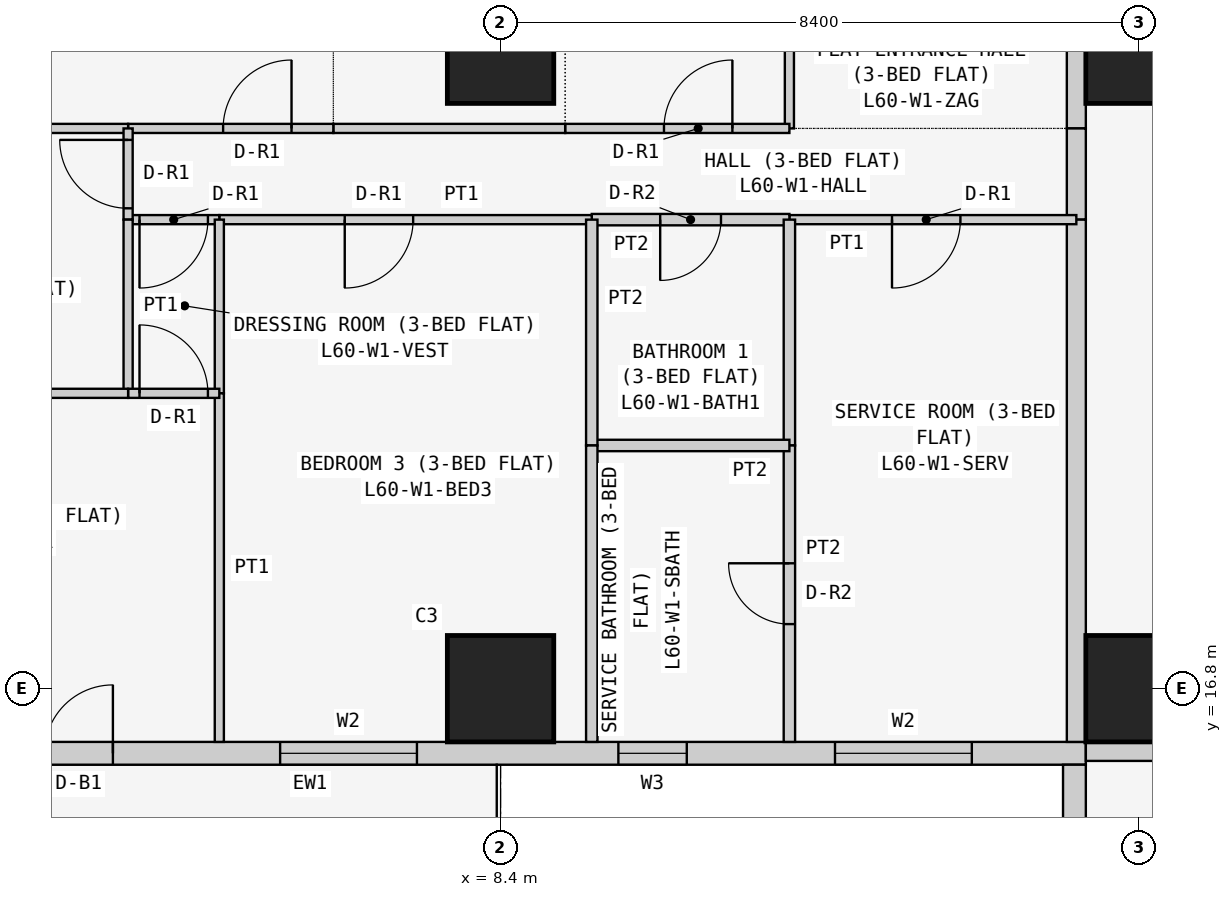
"""IFC4 building model, lengths in metres.
Left out: names, types, materials, properties, quantities, classifications, styles, units other than length and angle.
Written with IfcOpenShell. Run it as: python <this file> out.ifc"""

import sys

from ifc_helpers import new_model, si_unit, direction, frame, frame_2d, origin, origin_2d, place, context, subcontext, project, spatial, rectangle, extrude, element, fill, save


model = new_model("IFC4")
c1 = context("Model", 3, precision=1e-05, world=origin(), true_north=direction((0.0, 1.0)))
c2 = subcontext(c1, "Body", "Model", "MODEL_VIEW")
j1 = project(units=[si_unit("LENGTHUNIT", "METRE"), si_unit("PLANEANGLEUNIT", "RADIAN")], contexts=[c1])
p1 = place(None, origin())
s1 = spatial("IfcSite", under=j1, at=p1, CompositionType="ELEMENT")
p2 = place(p1, origin())
s2 = spatial("IfcBuilding", under=s1, at=p2, CompositionType="ELEMENT")
p3 = place(p2, frame((0.0, 0.0, 230.1)))
s3 = spatial("IfcBuildingStorey", under=s2, at=p3, CompositionType="ELEMENT", Elevation=230.1)
for number, where, z_axis, x_axis in (
    (1, (8.4, 16.8, 0.0), (0.0, 0.0, 1.0), (1.0, 0.0, 0.0)),
    (2, (8.4, 25.2, 0.0), (0.0, 0.0, 1.0), (1.0, 0.0, 0.0)),
    (3, (16.8, 16.8, 0.0), (0.0, 0.0, 1.0), (1.0, 0.0, 0.0)),
    (4, (16.8, 25.2, 0.0), (0.0, 0.0, 1.0), (1.0, 0.0, 0.0)),
):
    element("IfcColumn", number, at=place(p3, frame(where, z_axis=z_axis, x_axis=x_axis)), inside=s3, PredefinedType="COLUMN", context=c2, shape_type="SweptSolid", body=[
        extrude(rectangle(XDim=1.4, YDim=1.4, at=origin_2d()), origin(), (0.0, 0.0, 1.0), 3.6),
    ])
p4 = place(p3, frame((0.4, 15.95, 0.0), z_axis=(0.0, 0.0, 1.0), x_axis=(1.0, 0.0, 0.0)))
e5 = element("IfcWall", 5, at=p4, inside=s3, PredefinedType="SOLIDWALL", context=c2, shape_type="SweptSolid", body=[
    extrude(rectangle(XDim=15.7, YDim=0.3, at=frame_2d((7.85, 0.0))), origin(), (0.0, 0.0, 1.0), 3.45),
])
p5 = place(p4, frame((12.4, 0.0, 0.9)))
e6 = element("IfcOpeningElement", 6, at=p5, cuts=e5, PredefinedType="OPENING", context=c2, shape_type="SweptSolid", body=[
    extrude(rectangle(XDim=1.8, YDim=1.5, at=frame_2d((0.9, 0.75))), frame((0.0, 0.16, 0.0), z_axis=(0.0, -1.0, 0.0), x_axis=(1.0, 0.0, 0.0)), (0.0, 0.0, 1.0), 0.32),
])
p6 = place(p4, frame((9.55, 0.0, 1.5)))
e7 = element("IfcOpeningElement", 7, at=p6, cuts=e5, PredefinedType="OPENING", context=c2, shape_type="SweptSolid", body=[
    extrude(rectangle(XDim=0.9, YDim=0.7, at=frame_2d((0.45, 0.35))), frame((0.0, 0.16, 0.0), z_axis=(0.0, -1.0, 0.0), x_axis=(1.0, 0.0, 0.0)), (0.0, 0.0, 1.0), 0.32),
])
p7 = place(p4, frame((5.1, 0.0, 0.9)))
e8 = element("IfcOpeningElement", 8, at=p7, cuts=e5, PredefinedType="OPENING", context=c2, shape_type="SweptSolid", body=[
    extrude(rectangle(XDim=1.8, YDim=1.5, at=frame_2d((0.9, 0.75))), frame((0.0, 0.16, 0.0), z_axis=(0.0, -1.0, 0.0), x_axis=(1.0, 0.0, 0.0)), (0.0, 0.0, 1.0), 0.32),
])
p8 = place(p4, frame((2.0, 0.0, 0.0)))
e9 = element("IfcOpeningElement", 9, at=p8, cuts=e5, PredefinedType="OPENING", context=c2, shape_type="SweptSolid", body=[
    extrude(rectangle(XDim=0.9, YDim=2.4, at=frame_2d((0.45, 1.2))), frame((0.0, 0.16, 0.0), z_axis=(0.0, -1.0, 0.0), x_axis=(1.0, 0.0, 0.0)), (0.0, 0.0, 1.0), 0.32),
])
p9 = place(p4, frame((0.7, 0.0, 0.9)))
e10 = element("IfcOpeningElement", 10, at=p9, cuts=e5, PredefinedType="OPENING", context=c2, shape_type="SweptSolid", body=[
    extrude(rectangle(XDim=1.2, YDim=1.5, at=frame_2d((0.6, 0.75))), frame((0.0, 0.16, 0.0), z_axis=(0.0, -1.0, 0.0), x_axis=(1.0, 0.0, 0.0)), (0.0, 0.0, 1.0), 0.32),
])
p10 = place(p3, frame((15.95, 15.8, 0.0), z_axis=(0.0, 0.0, 1.0), x_axis=(0.0, -1.0, 0.0)))
e11 = element("IfcWall", 11, at=p10, inside=s3, PredefinedType="SOLIDWALL", context=c2, shape_type="SweptSolid", body=[
    extrude(rectangle(XDim=7.0, YDim=0.3, at=frame_2d((3.5, 0.0))), origin(), (0.0, 0.0, 1.0), 3.45),
])
p11 = place(p10, frame((1.5, 0.0, 0.9)))
e12 = element("IfcOpeningElement", 12, at=p11, cuts=e11, PredefinedType="OPENING", context=c2, shape_type="SweptSolid", body=[
    extrude(rectangle(XDim=2.4, YDim=1.5, at=frame_2d((1.2, 0.75))), frame((0.0, 0.16, 0.0), z_axis=(0.0, -1.0, 0.0), x_axis=(1.0, 0.0, 0.0)), (0.0, 0.0, 1.0), 0.32),
])
p12 = place(p10, frame((5.05, 0.0, 0.9)))
e13 = element("IfcOpeningElement", 13, at=p12, cuts=e11, PredefinedType="OPENING", context=c2, shape_type="SweptSolid", body=[
    extrude(rectangle(XDim=1.2, YDim=1.5, at=frame_2d((0.6, 0.75))), frame((0.0, 0.16, 0.0), z_axis=(0.0, -1.0, 0.0), x_axis=(1.0, 0.0, 0.0)), (0.0, 0.0, 1.0), 0.32),
])
p13 = place(p3, frame((22.971, 15.975, 0.0), z_axis=(0.0, 0.0, 1.0), x_axis=(-1.0, 0.0, 0.0)))
e14 = element("IfcWall", 14, at=p13, inside=s3, PredefinedType="PARTITIONING", context=c2, shape_type="SweptSolid", body=[
    extrude(rectangle(XDim=6.871, YDim=0.25, at=frame_2d((3.436, 0.0))), origin(), (0.0, 0.0, 1.0), 3.45),
])
p14 = place(p3, frame((15.975, 24.171, 0.0), z_axis=(0.0, 0.0, 1.0), x_axis=(0.0, 1.0, 0.0)))
e15 = element("IfcWall", 15, at=p14, inside=s3, PredefinedType="PARTITIONING", context=c2, shape_type="SweptSolid", body=[
    extrude(rectangle(XDim=5.229, YDim=0.25, at=frame_2d((2.615, 0.0))), origin(), (0.0, 0.0, 1.0), 3.45),
])
p15 = place(p14, frame((2.129, 0.0, 0.0)))
e16 = element("IfcOpeningElement", 16, at=p15, cuts=e15, PredefinedType="OPENING", context=c2, shape_type="SweptSolid", body=[
    extrude(rectangle(XDim=1.0, YDim=2.1, at=frame_2d((0.5, 1.05))), frame((0.0, 0.135, 0.0), z_axis=(0.0, -1.0, 0.0), x_axis=(1.0, 0.0, 0.0)), (0.0, 0.0, 1.0), 0.27),
])
p16 = place(p3, frame((15.975, 22.971, 0.0), z_axis=(0.0, 0.0, 1.0), x_axis=(0.0, 1.0, 0.0)))
e17 = element("IfcWall", 17, at=p16, inside=s3, PredefinedType="PARTITIONING", context=c2, shape_type="SweptSolid", body=[
    extrude(rectangle(XDim=1.2, YDim=0.25, at=frame_2d((0.6, 0.0))), origin(), (0.0, 0.0, 1.0), 3.45),
])
p17 = place(p3, frame((15.975, 16.1, 0.0), z_axis=(0.0, 0.0, 1.0), x_axis=(0.0, 1.0, 0.0)))
e18 = element("IfcWall", 18, at=p17, inside=s3, PredefinedType="PARTITIONING", context=c2, shape_type="SweptSolid", body=[
    extrude(rectangle(XDim=6.871, YDim=0.25, at=frame_2d((3.436, 0.0))), origin(), (0.0, 0.0, 1.0), 3.45),
])
p18 = place(p3, frame((12.2, 29.4, 0.0), z_axis=(0.0, 0.0, 1.0), x_axis=(0.0, -1.0, 0.0)))
e19 = element("IfcWall", 19, at=p18, inside=s3, PredefinedType="PARTITIONING", context=c2, shape_type="SweptSolid", body=[
    extrude(rectangle(XDim=5.229, YDim=0.12, at=frame_2d((2.615, 0.0))), origin(), (0.0, 0.0, 1.0), 3.45),
])
p19 = place(p3, frame((9.25, 24.171, 0.0), z_axis=(0.0, 0.0, 1.0), x_axis=(1.0, 0.0, 0.0)))
e20 = element("IfcWall", 20, at=p19, inside=s3, PredefinedType="PARTITIONING", context=c2, shape_type="SweptSolid", body=[
    extrude(rectangle(XDim=2.95, YDim=0.12, at=frame_2d((1.475, 0.0))), origin(), (0.0, 0.0, 1.0), 3.45),
])
p20 = place(p19, frame((1.3, 0.0, 0.0)))
e21 = element("IfcOpeningElement", 21, at=p20, cuts=e20, PredefinedType="OPENING", context=c2, shape_type="SweptSolid", body=[
    extrude(rectangle(XDim=0.9, YDim=2.1, at=frame_2d((0.45, 1.05))), frame((0.0, 0.07, 0.0), z_axis=(0.0, -1.0, 0.0), x_axis=(1.0, 0.0, 0.0)), (0.0, 0.0, 1.0), 0.14),
])
p21 = place(p3, frame((6.2, 24.171, 0.0), z_axis=(0.0, 0.0, 1.0), x_axis=(1.0, 0.0, 0.0)))
e22 = element("IfcWall", 22, at=p21, inside=s3, PredefinedType="PARTITIONING", context=c2, shape_type="SweptSolid", body=[
    extrude(rectangle(XDim=3.05, YDim=0.12, at=frame_2d((1.525, 0.0))), origin(), (0.0, 0.0, 1.0), 3.45),
])
p22 = place(p3, frame((3.5, 24.171, 0.0), z_axis=(0.0, 0.0, 1.0), x_axis=(1.0, 0.0, 0.0)))
e23 = element("IfcWall", 23, at=p22, inside=s3, PredefinedType="PARTITIONING", context=c2, shape_type="SweptSolid", body=[
    extrude(rectangle(XDim=2.7, YDim=0.12, at=frame_2d((1.35, 0.0))), origin(), (0.0, 0.0, 1.0), 3.45),
])
p23 = place(p22, frame((1.25, 0.0, 0.0)))
e24 = element("IfcOpeningElement", 24, at=p23, cuts=e23, PredefinedType="OPENING", context=c2, shape_type="SweptSolid", body=[
    extrude(rectangle(XDim=0.9, YDim=2.1, at=frame_2d((0.45, 1.05))), frame((0.0, 0.07, 0.0), z_axis=(0.0, -1.0, 0.0), x_axis=(1.0, 0.0, 0.0)), (0.0, 0.0, 1.0), 0.14),
])
p24 = place(p3, frame((-0.65, 24.171, 0.0), z_axis=(0.0, 0.0, 1.0), x_axis=(1.0, 0.0, 0.0)))
e25 = element("IfcWall", 25, at=p24, inside=s3, PredefinedType="PARTITIONING", context=c2, shape_type="SweptSolid", body=[
    extrude(rectangle(XDim=4.15, YDim=0.12, at=frame_2d((2.075, 0.0))), origin(), (0.0, 0.0, 1.0), 3.45),
])
p25 = place(p3, frame((12.2, 22.971, 0.0), z_axis=(0.0, 0.0, 1.0), x_axis=(1.0, 0.0, 0.0)))
e26 = element("IfcWall", 26, at=p25, inside=s3, PredefinedType="PARTITIONING", context=c2, shape_type="SweptSolid", body=[
    extrude(rectangle(XDim=3.775, YDim=0.12, at=frame_2d((1.888, 0.0))), origin(), (0.0, 0.0, 1.0), 3.45),
])
p26 = place(p25, frame((1.35, 0.0, 0.0)))
e27 = element("IfcOpeningElement", 27, at=p26, cuts=e26, PredefinedType="OPENING", context=c2, shape_type="SweptSolid", body=[
    extrude(rectangle(XDim=0.9, YDim=2.1, at=frame_2d((0.45, 1.05))), frame((0.0, 0.07, 0.0), z_axis=(0.0, -1.0, 0.0), x_axis=(1.0, 0.0, 0.0)), (0.0, 0.0, 1.0), 0.14),
])
p27 = place(p3, frame((9.6, 22.971, 0.0), z_axis=(0.0, 0.0, 1.0), x_axis=(1.0, 0.0, 0.0)))
e28 = element("IfcWall", 28, at=p27, inside=s3, PredefinedType="PARTITIONING", context=c2, shape_type="SweptSolid", body=[
    extrude(rectangle(XDim=2.6, YDim=0.15, at=frame_2d((1.3, 0.0))), origin(), (0.0, 0.0, 1.0), 3.45),
])
p28 = place(p27, frame((0.9, 0.0, 0.0)))
e29 = element("IfcOpeningElement", 29, at=p28, cuts=e28, PredefinedType="OPENING", context=c2, shape_type="SweptSolid", body=[
    extrude(rectangle(XDim=0.8, YDim=2.1, at=frame_2d((0.4, 1.05))), frame((0.0, 0.085, 0.0), z_axis=(0.0, -1.0, 0.0), x_axis=(1.0, 0.0, 0.0)), (0.0, 0.0, 1.0), 0.17),
])
p29 = place(p3, frame((4.7, 22.971, 0.0), z_axis=(0.0, 0.0, 1.0), x_axis=(1.0, 0.0, 0.0)))
e30 = element("IfcWall", 30, at=p29, inside=s3, PredefinedType="PARTITIONING", context=c2, shape_type="SweptSolid", body=[
    extrude(rectangle(XDim=4.9, YDim=0.12, at=frame_2d((2.45, 0.0))), origin(), (0.0, 0.0, 1.0), 3.45),
])
p30 = place(p29, frame((1.65, 0.0, 0.0)))
e31 = element("IfcOpeningElement", 31, at=p30, cuts=e30, PredefinedType="OPENING", context=c2, shape_type="SweptSolid", body=[
    extrude(rectangle(XDim=0.9, YDim=2.1, at=frame_2d((0.45, 1.05))), frame((0.0, 0.07, 0.0), z_axis=(0.0, -1.0, 0.0), x_axis=(1.0, 0.0, 0.0)), (0.0, 0.0, 1.0), 0.14),
])
p31 = place(p3, frame((3.5, 22.971, 0.0), z_axis=(0.0, 0.0, 1.0), x_axis=(1.0, 0.0, 0.0)))
e32 = element("IfcWall", 32, at=p31, inside=s3, PredefinedType="PARTITIONING", context=c2, shape_type="SweptSolid", body=[
    extrude(rectangle(XDim=1.2, YDim=0.12, at=frame_2d((0.6, 0.0))), origin(), (0.0, 0.0, 1.0), 3.45),
])
p32 = place(p31, frame((0.15, 0.0, 0.0)))
e33 = element("IfcOpeningElement", 33, at=p32, cuts=e32, PredefinedType="OPENING", context=c2, shape_type="SweptSolid", body=[
    extrude(rectangle(XDim=0.9, YDim=2.1, at=frame_2d((0.45, 1.05))), frame((0.0, 0.07, 0.0), z_axis=(0.0, -1.0, 0.0), x_axis=(1.0, 0.0, 0.0)), (0.0, 0.0, 1.0), 0.14),
])
p33 = place(p3, frame((3.5, 24.171, 0.0), z_axis=(0.0, 0.0, 1.0), x_axis=(0.0, -1.0, 0.0)))
e34 = element("IfcWall", 34, at=p33, inside=s3, PredefinedType="PARTITIONING", context=c2, shape_type="SweptSolid", body=[
    extrude(rectangle(XDim=1.2, YDim=0.12, at=frame_2d((0.6, 0.0))), origin(), (0.0, 0.0, 1.0), 3.45),
])
p34 = place(p33, frame((0.151, 0.0, 0.0)))
e35 = element("IfcOpeningElement", 35, at=p34, cuts=e34, PredefinedType="OPENING", context=c2, shape_type="SweptSolid", body=[
    extrude(rectangle(XDim=0.9, YDim=2.1, at=frame_2d((0.45, 1.05))), frame((0.0, 0.07, 0.0), z_axis=(0.0, -1.0, 0.0), x_axis=(1.0, 0.0, 0.0)), (0.0, 0.0, 1.0), 0.14),
])
p35 = place(p3, frame((12.2, 22.971, 0.0), z_axis=(0.0, 0.0, 1.0), x_axis=(0.0, -1.0, 0.0)))
e36 = element("IfcWall", 36, at=p35, inside=s3, PredefinedType="PARTITIONING", context=c2, shape_type="SweptSolid", body=[
    extrude(rectangle(XDim=2.971, YDim=0.15, at=frame_2d((1.485, 0.0))), origin(), (0.0, 0.0, 1.0), 3.45),
])
p36 = place(p3, frame((12.2, 20.0, 0.0), z_axis=(0.0, 0.0, 1.0), x_axis=(0.0, -1.0, 0.0)))
e37 = element("IfcWall", 37, at=p36, inside=s3, PredefinedType="PARTITIONING", context=c2, shape_type="SweptSolid", body=[
    extrude(rectangle(XDim=3.9, YDim=0.15, at=frame_2d((1.95, 0.0))), origin(), (0.0, 0.0, 1.0), 3.45),
])
p37 = place(p36, frame((1.55, 0.0, 0.0)))
e38 = element("IfcOpeningElement", 38, at=p37, cuts=e37, PredefinedType="OPENING", context=c2, shape_type="SweptSolid", body=[
    extrude(rectangle(XDim=0.8, YDim=2.1, at=frame_2d((0.4, 1.05))), frame((0.0, 0.085, 0.0), z_axis=(0.0, -1.0, 0.0), x_axis=(1.0, 0.0, 0.0)), (0.0, 0.0, 1.0), 0.17),
])
p38 = place(p3, frame((9.6, 20.0, 0.0), z_axis=(0.0, 0.0, 1.0), x_axis=(1.0, 0.0, 0.0)))
e39 = element("IfcWall", 39, at=p38, inside=s3, PredefinedType="PARTITIONING", context=c2, shape_type="SweptSolid", body=[
    extrude(rectangle(XDim=2.6, YDim=0.15, at=frame_2d((1.3, 0.0))), origin(), (0.0, 0.0, 1.0), 3.45),
])
p39 = place(p3, frame((9.6, 22.971, 0.0), z_axis=(0.0, 0.0, 1.0), x_axis=(0.0, -1.0, 0.0)))
e40 = element("IfcWall", 40, at=p39, inside=s3, PredefinedType="PARTITIONING", context=c2, shape_type="SweptSolid", body=[
    extrude(rectangle(XDim=2.971, YDim=0.15, at=frame_2d((1.485, 0.0))), origin(), (0.0, 0.0, 1.0), 3.45),
])
p40 = place(p3, frame((9.6, 20.0, 0.0), z_axis=(0.0, 0.0, 1.0), x_axis=(0.0, -1.0, 0.0)))
e41 = element("IfcWall", 41, at=p40, inside=s3, PredefinedType="PARTITIONING", context=c2, shape_type="SweptSolid", body=[
    extrude(rectangle(XDim=3.9, YDim=0.15, at=frame_2d((1.95, 0.0))), origin(), (0.0, 0.0, 1.0), 3.45),
])
p41 = place(p3, frame((4.7, 22.971, 0.0), z_axis=(0.0, 0.0, 1.0), x_axis=(0.0, -1.0, 0.0)))
e42 = element("IfcWall", 42, at=p41, inside=s3, PredefinedType="PARTITIONING", context=c2, shape_type="SweptSolid", body=[
    extrude(rectangle(XDim=2.285, YDim=0.12, at=frame_2d((1.143, 0.0))), origin(), (0.0, 0.0, 1.0), 3.45),
])
p42 = place(p3, frame((4.7, 20.686, 0.0), z_axis=(0.0, 0.0, 1.0), x_axis=(0.0, -1.0, 0.0)))
e43 = element("IfcWall", 43, at=p42, inside=s3, PredefinedType="PARTITIONING", context=c2, shape_type="SweptSolid", body=[
    extrude(rectangle(XDim=4.586, YDim=0.12, at=frame_2d((2.293, 0.0))), origin(), (0.0, 0.0, 1.0), 3.45),
])
p43 = place(p3, frame((3.5, 22.971, 0.0), z_axis=(0.0, 0.0, 1.0), x_axis=(0.0, -1.0, 0.0)))
e44 = element("IfcWall", 44, at=p43, inside=s3, PredefinedType="PARTITIONING", context=c2, shape_type="SweptSolid", body=[
    extrude(rectangle(XDim=2.285, YDim=0.12, at=frame_2d((1.143, 0.0))), origin(), (0.0, 0.0, 1.0), 3.45),
])
p44 = place(p3, frame((3.5, 20.686, 0.0), z_axis=(0.0, 0.0, 1.0), x_axis=(1.0, 0.0, 0.0)))
e45 = element("IfcWall", 45, at=p44, inside=s3, PredefinedType="PARTITIONING", context=c2, shape_type="SweptSolid", body=[
    extrude(rectangle(XDim=1.2, YDim=0.12, at=frame_2d((0.6, 0.0))), origin(), (0.0, 0.0, 1.0), 3.45),
])
p45 = place(p44, frame((0.15, 0.0, 0.0)))
e46 = element("IfcOpeningElement", 46, at=p45, cuts=e45, PredefinedType="OPENING", context=c2, shape_type="SweptSolid", body=[
    extrude(rectangle(XDim=0.9, YDim=2.1, at=frame_2d((0.45, 1.05))), frame((0.0, 0.07, 0.0), z_axis=(0.0, -1.0, 0.0), x_axis=(1.0, 0.0, 0.0)), (0.0, 0.0, 1.0), 0.14),
])
p46 = place(p3, frame((-0.65, 20.686, 0.0), z_axis=(0.0, 0.0, 1.0), x_axis=(1.0, 0.0, 0.0)))
e47 = element("IfcWall", 47, at=p46, inside=s3, PredefinedType="PARTITIONING", context=c2, shape_type="SweptSolid", body=[
    extrude(rectangle(XDim=4.15, YDim=0.12, at=frame_2d((2.075, 0.0))), origin(), (0.0, 0.0, 1.0), 3.45),
])
p47 = place(p5, origin())
e48 = element("IfcWindow", 48, at=p47, inside=s3, PartitioningType="SINGLE_PANEL", PredefinedType="WINDOW", context=c2, shape_type="SweptSolid", body=[
    extrude(rectangle(XDim=1.8, YDim=1.5, at=frame_2d((0.9, 0.75))), frame((0.0, 0.03, 0.0), z_axis=(0.0, -1.0, 0.0), x_axis=(1.0, 0.0, 0.0)), (0.0, 0.0, 1.0), 0.06),
])
fill(e6, e48)
p48 = place(p6, origin())
e49 = element("IfcWindow", 49, at=p48, inside=s3, PartitioningType="SINGLE_PANEL", PredefinedType="WINDOW", context=c2, shape_type="SweptSolid", body=[
    extrude(rectangle(XDim=0.9, YDim=0.7, at=frame_2d((0.45, 0.35))), frame((0.0, 0.03, 0.0), z_axis=(0.0, -1.0, 0.0), x_axis=(1.0, 0.0, 0.0)), (0.0, 0.0, 1.0), 0.06),
])
fill(e7, e49)
p49 = place(p7, origin())
e50 = element("IfcWindow", 50, at=p49, inside=s3, PartitioningType="SINGLE_PANEL", PredefinedType="WINDOW", context=c2, shape_type="SweptSolid", body=[
    extrude(rectangle(XDim=1.8, YDim=1.5, at=frame_2d((0.9, 0.75))), frame((0.0, 0.03, 0.0), z_axis=(0.0, -1.0, 0.0), x_axis=(1.0, 0.0, 0.0)), (0.0, 0.0, 1.0), 0.06),
])
fill(e8, e50)
p50 = place(p8, origin())
e51 = element("IfcDoor", 51, at=p50, inside=s3, OperationType="SINGLE_SWING_RIGHT", PredefinedType="DOOR", context=c2, shape_type="SweptSolid", body=[
    extrude(rectangle(XDim=0.9, YDim=2.4, at=frame_2d((0.45, 1.2))), frame((0.0, 0.025, 0.0), z_axis=(0.0, -1.0, 0.0), x_axis=(1.0, 0.0, 0.0)), (0.0, 0.0, 1.0), 0.05),
])
fill(e9, e51)
p51 = place(p20, origin())
e52 = element("IfcDoor", 52, at=p51, inside=s3, OperationType="SINGLE_SWING_RIGHT", PredefinedType="DOOR", context=c2, shape_type="SweptSolid", body=[
    extrude(rectangle(XDim=0.9, YDim=2.1, at=frame_2d((0.45, 1.05))), frame((0.0, 0.025, 0.0), z_axis=(0.0, -1.0, 0.0), x_axis=(1.0, 0.0, 0.0)), (0.0, 0.0, 1.0), 0.05),
])
fill(e21, e52)
p52 = place(p23, origin())
e53 = element("IfcDoor", 53, at=p52, inside=s3, OperationType="SINGLE_SWING_RIGHT", PredefinedType="DOOR", context=c2, shape_type="SweptSolid", body=[
    extrude(rectangle(XDim=0.9, YDim=2.1, at=frame_2d((0.45, 1.05))), frame((0.0, 0.025, 0.0), z_axis=(0.0, -1.0, 0.0), x_axis=(1.0, 0.0, 0.0)), (0.0, 0.0, 1.0), 0.05),
])
fill(e24, e53)
p53 = place(p26, frame((0.9, 0.0, 0.0), z_axis=(0.0, 0.0, 1.0), x_axis=(-1.0, 0.0, 0.0)))
e54 = element("IfcDoor", 54, at=p53, inside=s3, OperationType="SINGLE_SWING_RIGHT", PredefinedType="DOOR", context=c2, shape_type="SweptSolid", body=[
    extrude(rectangle(XDim=0.9, YDim=2.1, at=frame_2d((0.45, 1.05))), frame((0.0, 0.025, 0.0), z_axis=(0.0, -1.0, 0.0), x_axis=(1.0, 0.0, 0.0)), (0.0, 0.0, 1.0), 0.05),
])
fill(e27, e54)
p54 = place(p37, frame((0.8, 0.0, 0.0), z_axis=(0.0, 0.0, 1.0), x_axis=(-1.0, 0.0, 0.0)))
e55 = element("IfcDoor", 55, at=p54, inside=s3, OperationType="SINGLE_SWING_RIGHT", PredefinedType="DOOR", context=c2, shape_type="SweptSolid", body=[
    extrude(rectangle(XDim=0.8, YDim=2.1, at=frame_2d((0.4, 1.05))), frame((0.0, 0.025, 0.0), z_axis=(0.0, -1.0, 0.0), x_axis=(1.0, 0.0, 0.0)), (0.0, 0.0, 1.0), 0.05),
])
fill(e38, e55)
p55 = place(p28, frame((0.8, 0.0, 0.0), z_axis=(0.0, 0.0, 1.0), x_axis=(-1.0, 0.0, 0.0)))
e56 = element("IfcDoor", 56, at=p55, inside=s3, OperationType="SINGLE_SWING_RIGHT", PredefinedType="DOOR", context=c2, shape_type="SweptSolid", body=[
    extrude(rectangle(XDim=0.8, YDim=2.1, at=frame_2d((0.4, 1.05))), frame((0.0, 0.025, 0.0), z_axis=(0.0, -1.0, 0.0), x_axis=(1.0, 0.0, 0.0)), (0.0, 0.0, 1.0), 0.05),
])
fill(e29, e56)
p56 = place(p30, frame((0.9, 0.0, 0.0), z_axis=(0.0, 0.0, 1.0), x_axis=(-1.0, 0.0, 0.0)))
e57 = element("IfcDoor", 57, at=p56, inside=s3, OperationType="SINGLE_SWING_RIGHT", PredefinedType="DOOR", context=c2, shape_type="SweptSolid", body=[
    extrude(rectangle(XDim=0.9, YDim=2.1, at=frame_2d((0.45, 1.05))), frame((0.0, 0.025, 0.0), z_axis=(0.0, -1.0, 0.0), x_axis=(1.0, 0.0, 0.0)), (0.0, 0.0, 1.0), 0.05),
])
fill(e31, e57)
p57 = place(p32, frame((0.9, 0.0, 0.0), z_axis=(0.0, 0.0, 1.0), x_axis=(-1.0, 0.0, 0.0)))
e58 = element("IfcDoor", 58, at=p57, inside=s3, OperationType="SINGLE_SWING_RIGHT", PredefinedType="DOOR", context=c2, shape_type="SweptSolid", body=[
    extrude(rectangle(XDim=0.9, YDim=2.1, at=frame_2d((0.45, 1.05))), frame((0.0, 0.025, 0.0), z_axis=(0.0, -1.0, 0.0), x_axis=(1.0, 0.0, 0.0)), (0.0, 0.0, 1.0), 0.05),
])
fill(e33, e58)
p58 = place(p45, origin())
e59 = element("IfcDoor", 59, at=p58, inside=s3, OperationType="SINGLE_SWING_LEFT", PredefinedType="DOOR", context=c2, shape_type="SweptSolid", body=[
    extrude(rectangle(XDim=0.9, YDim=2.1, at=frame_2d((0.45, 1.05))), frame((0.0, 0.025, 0.0), z_axis=(0.0, -1.0, 0.0), x_axis=(1.0, 0.0, 0.0)), (0.0, 0.0, 1.0), 0.05),
])
fill(e46, e59)
p59 = place(p34, frame((0.9, 0.0, 0.0), z_axis=(0.0, 0.0, 1.0), x_axis=(-1.0, 0.0, 0.0)))
e60 = element("IfcDoor", 60, at=p59, inside=s3, OperationType="SINGLE_SWING_RIGHT", PredefinedType="DOOR", context=c2, shape_type="SweptSolid", body=[
    extrude(rectangle(XDim=0.9, YDim=2.1, at=frame_2d((0.45, 1.05))), frame((0.0, 0.025, 0.0), z_axis=(0.0, -1.0, 0.0), x_axis=(1.0, 0.0, 0.0)), (0.0, 0.0, 1.0), 0.05),
])
fill(e35, e60)
save(model, sys.argv[1])
